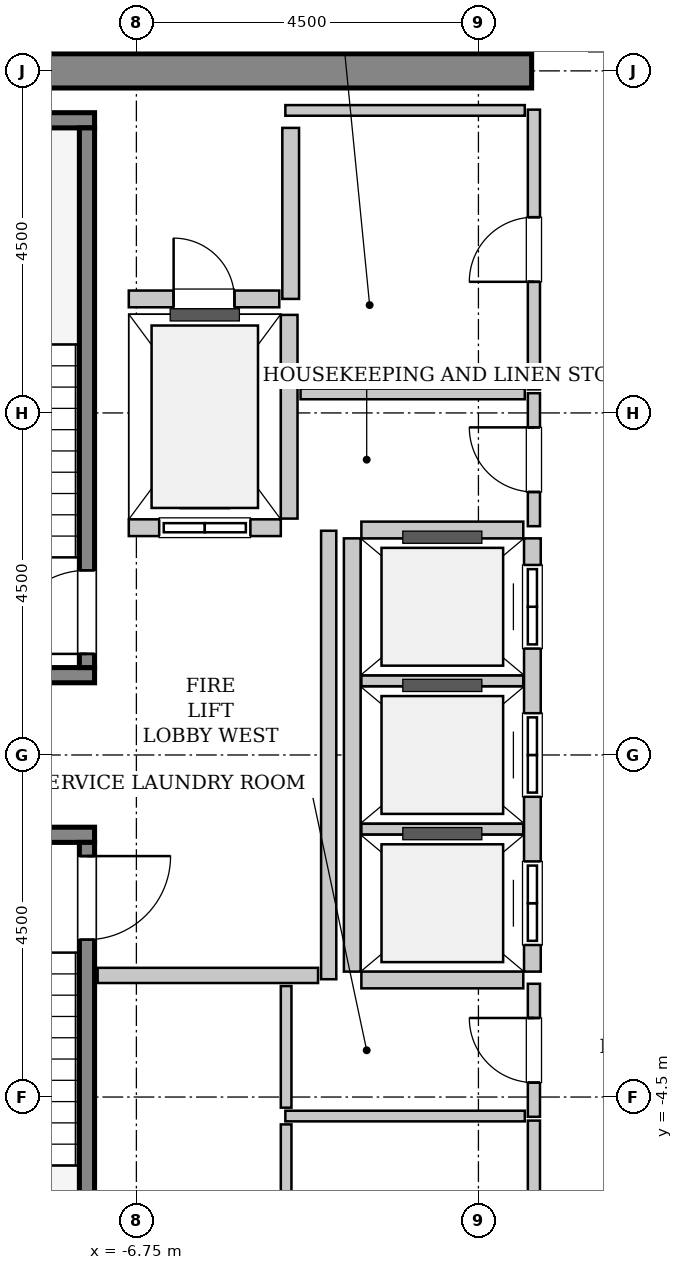
"""IFC4 building model, lengths in metres.
Left out: names, types, materials, properties, quantities, classifications, styles, units other than length and angle.
Written with IfcOpenShell. Run it as: python <this file> out.ifc"""

import sys

from ifc_helpers import new_model, si_unit, direction, frame, frame_2d, origin, place, context, subcontext, project, spatial, rectangle, extrude, source, transform, mapped, element, fill, save


model = new_model("IFC4")
c1 = context("Model", 3, precision=1e-05, world=origin(), true_north=direction((0.0, 1.0)))
c2 = subcontext(c1, "Body", "Model", "MODEL_VIEW")
j1 = project(units=[si_unit("LENGTHUNIT", "METRE"), si_unit("PLANEANGLEUNIT", "RADIAN")], contexts=[c1])
p1 = place(None, origin())
s1 = spatial("IfcSite", under=j1, at=p1, CompositionType="ELEMENT")
p2 = place(p1, origin())
s2 = spatial("IfcBuilding", under=s1, at=p2, CompositionType="ELEMENT")
p3 = place(p2, frame((0.0, 0.0, 298.8)))
s3 = spatial("IfcBuildingStorey", under=s2, at=p3, CompositionType="ELEMENT", Elevation=298.8)
m1 = source(origin(), c2, "Body", "SweptSolid", [
    extrude(rectangle(XDim=9.925, YDim=0.45, at=frame_2d((4.962, 0.0))), origin(), (0.0, 0.0, 1.0), 3.8),
])
p4 = place(p3, frame((-11.475, 9.0, 0.0), z_axis=(0.0, 0.0, 1.0), x_axis=(1.0, 0.0, 0.0)))
e1 = element("IfcWall", 1, at=p4, inside=s3, PredefinedType="SHEAR", context=c2, shape_type="MappedRepresentation", body=[
    mapped(m1, transform((0.0, 0.0, 0.0), x_axis=(1.0, 0.0, 0.0), y_axis=(0.0, 1.0, 0.0), z_axis=(0.0, 0.0, 1.0), scale=1.0)),
])
m2 = source(origin(), c2, "Body", "SweptSolid", [
    extrude(rectangle(XDim=3.4, YDim=0.2, at=frame_2d((1.7, 0.0))), origin(), (0.0, 0.0, 1.0), 3.8),
])
p5 = place(p3, frame((-7.3, 1.05, 0.0), z_axis=(0.0, 0.0, 1.0), x_axis=(-1.0, 0.0, 0.0)))
e2 = element("IfcWall", 2, at=p5, inside=s3, PredefinedType="SOLIDWALL", context=c2, shape_type="MappedRepresentation", body=[
    mapped(m2, transform((0.0, 0.0, 0.0), x_axis=(1.0, 0.0, 0.0), y_axis=(0.0, 1.0, 0.0), z_axis=(0.0, 0.0, 1.0), scale=1.0)),
])
m3 = source(origin(), c2, "Body", "SweptSolid", [
    extrude(rectangle(XDim=3.73, YDim=0.2, at=frame_2d((1.865, 0.0))), origin(), (0.0, 0.0, 1.0), 3.8),
])
p6 = place(p3, frame((-7.3, 8.35, 0.0), z_axis=(0.0, 0.0, 1.0), x_axis=(-1.0, 0.0, 0.0)))
e3 = element("IfcWall", 3, at=p6, inside=s3, PredefinedType="SOLIDWALL", context=c2, shape_type="MappedRepresentation", body=[
    mapped(m3, transform((0.0, 0.0, 0.0), x_axis=(1.0, 0.0, 0.0), y_axis=(0.0, 1.0, 0.0), z_axis=(0.0, 0.0, 1.0), scale=1.0)),
])
m4 = source(origin(), c2, "Body", "SweptSolid", [
    extrude(rectangle(XDim=7.1, YDim=0.2, at=frame_2d((3.55, 0.0))), origin(), (0.0, 0.0, 1.0), 3.8),
])
p7 = place(p3, frame((-7.4, 1.15, 0.0), z_axis=(0.0, 0.0, 1.0), x_axis=(0.0, 1.0, 0.0)))
e4 = element("IfcWall", 4, at=p7, inside=s3, PredefinedType="SOLIDWALL", context=c2, shape_type="MappedRepresentation", body=[
    mapped(m4, transform((0.0, 0.0, 0.0), x_axis=(1.0, 0.0, 0.0), y_axis=(0.0, 1.0, 0.0), z_axis=(0.0, 0.0, 1.0), scale=1.0)),
])
p8 = place(p7, frame((0.18, 0.0, 0.0)))
e5 = element("IfcOpeningElement", 5, at=p8, cuts=e4, PredefinedType="OPENING", context=c2, shape_type="SweptSolid", body=[
    extrude(rectangle(XDim=1.1, YDim=2.15, at=frame_2d((0.55, 1.075))), frame((0.0, 0.11, 0.0), z_axis=(0.0, -1.0, 0.0), x_axis=(1.0, 0.0, 0.0)), (0.0, 0.0, 1.0), 0.22),
])
p9 = place(p3, frame((-10.7, -1.05, 0.0), z_axis=(0.0, 0.0, 1.0), x_axis=(1.0, 0.0, 0.0)))
e6 = element("IfcWall", 6, at=p9, inside=s3, PredefinedType="SOLIDWALL", context=c2, shape_type="MappedRepresentation", body=[
    mapped(m2, transform((0.0, 0.0, 0.0), x_axis=(1.0, 0.0, 0.0), y_axis=(0.0, 1.0, 0.0), z_axis=(0.0, 0.0, 1.0), scale=1.0)),
])
p10 = place(p3, frame((-7.4, -1.15, 0.0), z_axis=(0.0, 0.0, 1.0), x_axis=(0.0, -1.0, 0.0)))
e7 = element("IfcWall", 7, at=p10, inside=s3, PredefinedType="SOLIDWALL", context=c2, shape_type="MappedRepresentation", body=[
    mapped(m4, transform((0.0, 0.0, 0.0), x_axis=(1.0, 0.0, 0.0), y_axis=(0.0, 1.0, 0.0), z_axis=(0.0, 0.0, 1.0), scale=1.0)),
])
p11 = place(p10, frame((0.18, 0.0, 0.0)))
e8 = element("IfcOpeningElement", 8, at=p11, cuts=e7, PredefinedType="OPENING", context=c2, shape_type="SweptSolid", body=[
    extrude(rectangle(XDim=1.1, YDim=2.15, at=frame_2d((0.55, 1.075))), frame((0.0, 0.11, 0.0), z_axis=(0.0, -1.0, 0.0), x_axis=(1.0, 0.0, 0.0)), (0.0, 0.0, 1.0), 0.22),
])
m5 = source(origin(), c2, "Body", "SweptSolid", [
    extrude(rectangle(XDim=2.0, YDim=0.22, at=frame_2d((1.0, 0.0))), origin(), (0.0, 0.0, 1.0), 3.535),
])
p12 = place(p3, frame((-6.85, 2.99, 0.0), z_axis=(0.0, 0.0, 1.0), x_axis=(1.0, 0.0, 0.0)))
e9 = element("IfcWall", 9, at=p12, inside=s3, PredefinedType="SOLIDWALL", context=c2, shape_type="MappedRepresentation", body=[
    mapped(m5, transform((0.0, 0.0, 0.0), x_axis=(1.0, 0.0, 0.0), y_axis=(0.0, 1.0, 0.0), z_axis=(0.0, 0.0, 1.0), scale=1.0)),
])
p13 = place(p12, frame((0.4, 0.0, 0.0)))
e10 = element("IfcOpeningElement", 10, at=p13, cuts=e9, PredefinedType="OPENING", context=c2, shape_type="SweptSolid", body=[
    extrude(rectangle(XDim=1.2, YDim=2.2, at=frame_2d((0.6, 1.1))), frame((0.0, 0.12, 0.0), z_axis=(0.0, -1.0, 0.0), x_axis=(1.0, 0.0, 0.0)), (0.0, 0.0, 1.0), 0.24),
])
m6 = source(origin(), c2, "Body", "SweptSolid", [
    extrude(rectangle(XDim=2.68, YDim=0.22, at=frame_2d((1.34, 0.0))), origin(), (0.0, 0.0, 1.0), 3.535),
])
p14 = place(p3, frame((-4.74, 3.11, 0.0), z_axis=(0.0, 0.0, 1.0), x_axis=(0.0, 1.0, 0.0)))
e11 = element("IfcWall", 11, at=p14, inside=s3, PredefinedType="SOLIDWALL", context=c2, shape_type="MappedRepresentation", body=[
    mapped(m6, transform((0.0, 0.0, 0.0), x_axis=(1.0, 0.0, 0.0), y_axis=(0.0, 1.0, 0.0), z_axis=(0.0, 0.0, 1.0), scale=1.0)),
])
m7 = source(origin(), c2, "Body", "SweptSolid", [
    extrude(rectangle(XDim=5.7, YDim=0.22, at=frame_2d((2.85, 0.0))), origin(), (0.0, 0.0, 1.0), 3.535),
])
p15 = place(p3, frame((-1.54, -2.85, 0.0), z_axis=(0.0, 0.0, 1.0), x_axis=(0.0, 1.0, 0.0)))
e12 = element("IfcWall", 12, at=p15, inside=s3, PredefinedType="SOLIDWALL", context=c2, shape_type="MappedRepresentation", body=[
    mapped(m7, transform((0.0, 0.0, 0.0), x_axis=(1.0, 0.0, 0.0), y_axis=(0.0, 1.0, 0.0), z_axis=(0.0, 0.0, 1.0), scale=1.0)),
])
p16 = place(p15, frame((0.35, 0.0, 0.0)))
e13 = element("IfcOpeningElement", 13, at=p16, cuts=e12, PredefinedType="OPENING", context=c2, shape_type="SweptSolid", body=[
    extrude(rectangle(XDim=1.1, YDim=2.2, at=frame_2d((0.55, 1.1))), frame((0.0, 0.12, 0.0), z_axis=(0.0, -1.0, 0.0), x_axis=(1.0, 0.0, 0.0)), (0.0, 0.0, 1.0), 0.24),
])
p17 = place(p15, frame((2.3, 0.0, 0.0)))
e14 = element("IfcOpeningElement", 14, at=p17, cuts=e12, PredefinedType="OPENING", context=c2, shape_type="SweptSolid", body=[
    extrude(rectangle(XDim=1.1, YDim=2.2, at=frame_2d((0.55, 1.1))), frame((0.0, 0.12, 0.0), z_axis=(0.0, -1.0, 0.0), x_axis=(1.0, 0.0, 0.0)), (0.0, 0.0, 1.0), 0.24),
])
p18 = place(p15, frame((4.25, 0.0, 0.0)))
e15 = element("IfcOpeningElement", 15, at=p18, cuts=e12, PredefinedType="OPENING", context=c2, shape_type="SweptSolid", body=[
    extrude(rectangle(XDim=1.1, YDim=2.2, at=frame_2d((0.55, 1.1))), frame((0.0, 0.12, 0.0), z_axis=(0.0, -1.0, 0.0), x_axis=(1.0, 0.0, 0.0)), (0.0, 0.0, 1.0), 0.24),
])
p19 = place(p3, frame((-3.91, 2.85, 0.0), z_axis=(0.0, 0.0, 1.0), x_axis=(0.0, -1.0, 0.0)))
e16 = element("IfcWall", 16, at=p19, inside=s3, PredefinedType="SOLIDWALL", context=c2, shape_type="MappedRepresentation", body=[
    mapped(m7, transform((0.0, 0.0, 0.0), x_axis=(1.0, 0.0, 0.0), y_axis=(0.0, 1.0, 0.0), z_axis=(0.0, 0.0, 1.0), scale=1.0)),
])
m8 = source(origin(), c2, "Body", "SweptSolid", [
    extrude(rectangle(XDim=2.13, YDim=0.22, at=frame_2d((1.065, 0.0))), origin(), (0.0, 0.0, 1.0), 3.535),
])
p20 = place(p3, frame((-3.79, -2.96, 0.0), z_axis=(0.0, 0.0, 1.0), x_axis=(1.0, 0.0, 0.0)))
e17 = element("IfcWall", 17, at=p20, inside=s3, PredefinedType="SOLIDWALL", context=c2, shape_type="MappedRepresentation", body=[
    mapped(m8, transform((0.0, 0.0, 0.0), x_axis=(1.0, 0.0, 0.0), y_axis=(0.0, 1.0, 0.0), z_axis=(0.0, 0.0, 1.0), scale=1.0)),
])
m9 = source(origin(), c2, "Body", "SweptSolid", [
    extrude(rectangle(XDim=2.13, YDim=0.14, at=frame_2d((1.065, 0.0))), origin(), (0.0, 0.0, 1.0), 3.535),
])
for number, where, z_axis, x_axis in (
    (18, (-3.79, -0.975, 0.0), (0.0, 0.0, 1.0), (1.0, 0.0, 0.0)),
    (19, (-3.79, 0.975, 0.0), (0.0, 0.0, 1.0), (1.0, 0.0, 0.0)),
):
    element("IfcWall", number, at=place(p3, frame(where, z_axis=z_axis, x_axis=x_axis)), inside=s3, PredefinedType="PARTITIONING", context=c2, shape_type="MappedRepresentation", body=[
        mapped(m9, transform((0.0, 0.0, 0.0), x_axis=(1.0, 0.0, 0.0), y_axis=(0.0, 1.0, 0.0), z_axis=(0.0, 0.0, 1.0), scale=1.0)),
    ])
p21 = place(p3, frame((-1.66, 2.96, 0.0), z_axis=(0.0, 0.0, 1.0), x_axis=(-1.0, 0.0, 0.0)))
e20 = element("IfcWall", 20, at=p21, inside=s3, PredefinedType="SOLIDWALL", context=c2, shape_type="MappedRepresentation", body=[
    mapped(m8, transform((0.0, 0.0, 0.0), x_axis=(1.0, 0.0, 0.0), y_axis=(0.0, 1.0, 0.0), z_axis=(0.0, 0.0, 1.0), scale=1.0)),
])
m10 = source(origin(), c2, "Body", "SweptSolid", [
    extrude(rectangle(XDim=2.25, YDim=0.22, at=frame_2d((1.125, 0.0))), origin(), (0.0, 0.0, 1.0), 3.535),
])
p22 = place(p3, frame((-4.72, 6.0, 0.0), z_axis=(0.0, 0.0, 1.0), x_axis=(0.0, 1.0, 0.0)))
e21 = element("IfcWall", 21, at=p22, inside=s3, PredefinedType="SOLIDWALL", context=c2, shape_type="MappedRepresentation", body=[
    mapped(m10, transform((0.0, 0.0, 0.0), x_axis=(1.0, 0.0, 0.0), y_axis=(0.0, 1.0, 0.0), z_axis=(0.0, 0.0, 1.0), scale=1.0)),
])
m11 = source(origin(), c2, "Body", "SweptSolid", [
    extrude(rectangle(XDim=1.98, YDim=0.22, at=frame_2d((0.99, 0.0))), origin(), (0.0, 0.0, 1.0), 3.535),
])
p23 = place(p3, frame((-6.85, 6.0, 0.0), z_axis=(0.0, 0.0, 1.0), x_axis=(1.0, 0.0, 0.0)))
e22 = element("IfcWall", 22, at=p23, inside=s3, PredefinedType="SOLIDWALL", context=c2, shape_type="MappedRepresentation", body=[
    mapped(m11, transform((0.0, 0.0, 0.0), x_axis=(1.0, 0.0, 0.0), y_axis=(0.0, 1.0, 0.0), z_axis=(0.0, 0.0, 1.0), scale=1.0)),
])
p24 = place(p23, frame((0.59, 0.0, 0.0)))
e23 = element("IfcOpeningElement", 23, at=p24, cuts=e22, PredefinedType="OPENING", context=c2, shape_type="SweptSolid", body=[
    extrude(rectangle(XDim=0.8, YDim=2.0, at=frame_2d((0.4, 1.0))), frame((0.0, 0.12, 0.0), z_axis=(0.0, -1.0, 0.0), x_axis=(1.0, 0.0, 0.0)), (0.0, 0.0, 1.0), 0.24),
])
m12 = source(origin(), c2, "Body", "SweptSolid", [
    extrude(rectangle(XDim=5.9, YDim=0.2, at=frame_2d((2.95, 0.0))), origin(), (0.0, 0.0, 1.0), 3.535),
])
p25 = place(p3, frame((-4.22, -2.95, 0.0), z_axis=(0.0, 0.0, 1.0), x_axis=(0.0, 1.0, 0.0)))
e24 = element("IfcWall", 24, at=p25, inside=s3, PredefinedType="PARTITIONING", context=c2, shape_type="MappedRepresentation", body=[
    mapped(m12, transform((0.0, 0.0, 0.0), x_axis=(1.0, 0.0, 0.0), y_axis=(0.0, 1.0, 0.0), z_axis=(0.0, 0.0, 1.0), scale=1.0)),
])
m13 = source(origin(), c2, "Body", "SweptSolid", [
    extrude(rectangle(XDim=2.9, YDim=0.2, at=frame_2d((1.45, 0.0))), origin(), (0.0, 0.0, 1.0), 3.535),
])
p26 = place(p3, frame((-7.26, -2.9, 0.0), z_axis=(0.0, 0.0, 1.0), x_axis=(1.0, 0.0, 0.0)))
e25 = element("IfcWall", 25, at=p26, inside=s3, PredefinedType="PARTITIONING", context=c2, shape_type="MappedRepresentation", body=[
    mapped(m13, transform((0.0, 0.0, 0.0), x_axis=(1.0, 0.0, 0.0), y_axis=(0.0, 1.0, 0.0), z_axis=(0.0, 0.0, 1.0), scale=1.0)),
])
m14 = source(origin(), c2, "Body", "SweptSolid", [
    extrude(rectangle(XDim=1.75, YDim=0.16, at=frame_2d((0.875, 0.0))), origin(), (0.0, 0.0, 1.0), 3.535),
])
p27 = place(p3, frame((-1.52, 3.01, 0.0), z_axis=(0.0, 0.0, 1.0), x_axis=(0.0, 1.0, 0.0)))
e26 = element("IfcWall", 26, at=p27, inside=s3, PredefinedType="PARTITIONING", context=c2, shape_type="MappedRepresentation", body=[
    mapped(m14, transform((0.0, 0.0, 0.0), x_axis=(1.0, 0.0, 0.0), y_axis=(0.0, 1.0, 0.0), z_axis=(0.0, 0.0, 1.0), scale=1.0)),
])
p28 = place(p27, frame((0.45, 0.0, 0.0)))
e27 = element("IfcOpeningElement", 27, at=p28, cuts=e26, PredefinedType="OPENING", context=c2, shape_type="SweptSolid", body=[
    extrude(rectangle(XDim=0.85, YDim=2.1, at=frame_2d((0.425, 1.05))), frame((0.0, 0.09, 0.0), z_axis=(0.0, -1.0, 0.0), x_axis=(1.0, 0.0, 0.0)), (0.0, 0.0, 1.0), 0.18),
])
m15 = source(origin(), c2, "Body", "SweptSolid", [
    extrude(rectangle(XDim=2.95, YDim=0.14, at=frame_2d((1.475, 0.0))), origin(), (0.0, 0.0, 1.0), 3.535),
])
p29 = place(p3, frame((-4.59, 4.75, 0.0), z_axis=(0.0, 0.0, 1.0), x_axis=(1.0, 0.0, 0.0)))
e28 = element("IfcWall", 28, at=p29, inside=s3, PredefinedType="PARTITIONING", context=c2, shape_type="MappedRepresentation", body=[
    mapped(m15, transform((0.0, 0.0, 0.0), x_axis=(1.0, 0.0, 0.0), y_axis=(0.0, 1.0, 0.0), z_axis=(0.0, 0.0, 1.0), scale=1.0)),
])
m16 = source(origin(), c2, "Body", "SweptSolid", [
    extrude(rectangle(XDim=3.68, YDim=0.16, at=frame_2d((1.84, 0.0))), origin(), (0.0, 0.0, 1.0), 3.535),
])
p30 = place(p3, frame((-1.52, 4.81, 0.0), z_axis=(0.0, 0.0, 1.0), x_axis=(0.0, 1.0, 0.0)))
e29 = element("IfcWall", 29, at=p30, inside=s3, PredefinedType="PARTITIONING", context=c2, shape_type="MappedRepresentation", body=[
    mapped(m16, transform((0.0, 0.0, 0.0), x_axis=(1.0, 0.0, 0.0), y_axis=(0.0, 1.0, 0.0), z_axis=(0.0, 0.0, 1.0), scale=1.0)),
])
p31 = place(p30, frame((1.415, 0.0, 0.0)))
e30 = element("IfcOpeningElement", 30, at=p31, cuts=e29, PredefinedType="OPENING", context=c2, shape_type="SweptSolid", body=[
    extrude(rectangle(XDim=0.85, YDim=2.1, at=frame_2d((0.425, 1.05))), frame((0.0, 0.09, 0.0), z_axis=(0.0, -1.0, 0.0), x_axis=(1.0, 0.0, 0.0)), (0.0, 0.0, 1.0), 0.18),
])
m17 = source(origin(), c2, "Body", "SweptSolid", [
    extrude(rectangle(XDim=3.15, YDim=0.14, at=frame_2d((1.575, 0.0))), origin(), (0.0, 0.0, 1.0), 3.535),
])
p32 = place(p3, frame((-4.79, 8.48, 0.0), z_axis=(0.0, 0.0, 1.0), x_axis=(1.0, 0.0, 0.0)))
e31 = element("IfcWall", 31, at=p32, inside=s3, PredefinedType="PARTITIONING", context=c2, shape_type="MappedRepresentation", body=[
    mapped(m17, transform((0.0, 0.0, 0.0), x_axis=(1.0, 0.0, 0.0), y_axis=(0.0, 1.0, 0.0), z_axis=(0.0, 0.0, 1.0), scale=1.0)),
])
p33 = place(p3, frame((-1.52, -4.76, 0.0), z_axis=(0.0, 0.0, 1.0), x_axis=(0.0, 1.0, 0.0)))
e32 = element("IfcWall", 32, at=p33, inside=s3, PredefinedType="PARTITIONING", context=c2, shape_type="MappedRepresentation", body=[
    mapped(m14, transform((0.0, 0.0, 0.0), x_axis=(1.0, 0.0, 0.0), y_axis=(0.0, 1.0, 0.0), z_axis=(0.0, 0.0, 1.0), scale=1.0)),
])
p34 = place(p33, frame((0.45, 0.0, 0.0)))
e33 = element("IfcOpeningElement", 33, at=p34, cuts=e32, PredefinedType="OPENING", context=c2, shape_type="SweptSolid", body=[
    extrude(rectangle(XDim=0.85, YDim=2.1, at=frame_2d((0.425, 1.05))), frame((0.0, 0.09, 0.0), z_axis=(0.0, -1.0, 0.0), x_axis=(1.0, 0.0, 0.0)), (0.0, 0.0, 1.0), 0.18),
])
p35 = place(p3, frame((-4.79, -4.75, 0.0), z_axis=(0.0, 0.0, 1.0), x_axis=(1.0, 0.0, 0.0)))
e34 = element("IfcWall", 34, at=p35, inside=s3, PredefinedType="PARTITIONING", context=c2, shape_type="MappedRepresentation", body=[
    mapped(m17, transform((0.0, 0.0, 0.0), x_axis=(1.0, 0.0, 0.0), y_axis=(0.0, 1.0, 0.0), z_axis=(0.0, 0.0, 1.0), scale=1.0)),
])
m18 = source(origin(), c2, "Body", "SweptSolid", [
    extrude(rectangle(XDim=1.6, YDim=0.14, at=frame_2d((0.8, 0.0))), origin(), (0.0, 0.0, 1.0), 3.535),
])
p36 = place(p3, frame((-4.78, -4.64, 0.0), z_axis=(0.0, 0.0, 1.0), x_axis=(0.0, 1.0, 0.0)))
e35 = element("IfcWall", 35, at=p36, inside=s3, PredefinedType="PARTITIONING", context=c2, shape_type="MappedRepresentation", body=[
    mapped(m18, transform((0.0, 0.0, 0.0), x_axis=(1.0, 0.0, 0.0), y_axis=(0.0, 1.0, 0.0), z_axis=(0.0, 0.0, 1.0), scale=1.0)),
])
p37 = place(p3, frame((-1.52, -8.49, 0.0), z_axis=(0.0, 0.0, 1.0), x_axis=(0.0, 1.0, 0.0)))
e36 = element("IfcWall", 36, at=p37, inside=s3, PredefinedType="PARTITIONING", context=c2, shape_type="MappedRepresentation", body=[
    mapped(m16, transform((0.0, 0.0, 0.0), x_axis=(1.0, 0.0, 0.0), y_axis=(0.0, 1.0, 0.0), z_axis=(0.0, 0.0, 1.0), scale=1.0)),
])
p38 = place(p37, frame((1.415, 0.0, 0.0)))
e37 = element("IfcOpeningElement", 37, at=p38, cuts=e36, PredefinedType="OPENING", context=c2, shape_type="SweptSolid", body=[
    extrude(rectangle(XDim=0.85, YDim=2.1, at=frame_2d((0.425, 1.05))), frame((0.0, 0.09, 0.0), z_axis=(0.0, -1.0, 0.0), x_axis=(1.0, 0.0, 0.0)), (0.0, 0.0, 1.0), 0.18),
])
m19 = source(origin(), c2, "Body", "SweptSolid", [
    extrude(rectangle(XDim=3.63, YDim=0.14, at=frame_2d((1.815, 0.0))), origin(), (0.0, 0.0, 1.0), 3.535),
])
p39 = place(p3, frame((-4.78, -8.49, 0.0), z_axis=(0.0, 0.0, 1.0), x_axis=(0.0, 1.0, 0.0)))
e38 = element("IfcWall", 38, at=p39, inside=s3, PredefinedType="PARTITIONING", context=c2, shape_type="MappedRepresentation", body=[
    mapped(m19, transform((0.0, 0.0, 0.0), x_axis=(1.0, 0.0, 0.0), y_axis=(0.0, 1.0, 0.0), z_axis=(0.0, 0.0, 1.0), scale=1.0)),
])
m20 = source(origin(), c2, "Body", "SweptSolid", [
    extrude(rectangle(XDim=1.1, YDim=2.15, at=frame_2d((0.55, 1.075))), frame((0.0, 0.025, 0.0), z_axis=(0.0, -1.0, 0.0), x_axis=(1.0, 0.0, 0.0)), (0.0, 0.0, 1.0), 0.05),
])
p40 = place(p8, origin())
e39 = element("IfcDoor", 39, at=p40, inside=s3, OperationType="SINGLE_SWING_LEFT", PredefinedType="DOOR", context=c2, shape_type="MappedRepresentation", body=[
    mapped(m20, transform((0.0, 0.0, 0.0), x_axis=(1.0, 0.0, 0.0), y_axis=(0.0, 1.0, 0.0), z_axis=(0.0, 0.0, 1.0), scale=1.0)),
])
fill(e5, e39)
p41 = place(p11, origin())
e40 = element("IfcDoor", 40, at=p41, inside=s3, OperationType="SINGLE_SWING_LEFT", PredefinedType="DOOR", context=c2, shape_type="MappedRepresentation", body=[
    mapped(m20, transform((0.0, 0.0, 0.0), x_axis=(1.0, 0.0, 0.0), y_axis=(0.0, 1.0, 0.0), z_axis=(0.0, 0.0, 1.0), scale=1.0)),
])
fill(e8, e40)
m21 = source(origin(), c2, "Body", "SweptSolid", [
    extrude(rectangle(XDim=1.2, YDim=2.2, at=frame_2d((0.6, 1.1))), frame((0.0, 0.025, 0.0), z_axis=(0.0, -1.0, 0.0), x_axis=(1.0, 0.0, 0.0)), (0.0, 0.0, 1.0), 0.05),
])
p42 = place(p13, origin())
e41 = element("IfcDoor", 41, at=p42, inside=s3, OperationType="SLIDING_TO_LEFT", PredefinedType="DOOR", context=c2, shape_type="MappedRepresentation", body=[
    mapped(m21, transform((0.0, 0.0, 0.0), x_axis=(1.0, 0.0, 0.0), y_axis=(0.0, 1.0, 0.0), z_axis=(0.0, 0.0, 1.0), scale=1.0)),
])
fill(e10, e41)
m22 = source(origin(), c2, "Body", "SweptSolid", [
    extrude(rectangle(XDim=1.1, YDim=2.2, at=frame_2d((0.55, 1.1))), frame((0.0, 0.025, 0.0), z_axis=(0.0, -1.0, 0.0), x_axis=(1.0, 0.0, 0.0)), (0.0, 0.0, 1.0), 0.05),
])
p43 = place(p16, origin())
e42 = element("IfcDoor", 42, at=p43, inside=s3, OperationType="DOUBLE_DOOR_SLIDING", PredefinedType="DOOR", context=c2, shape_type="MappedRepresentation", body=[
    mapped(m22, transform((0.0, 0.0, 0.0), x_axis=(1.0, 0.0, 0.0), y_axis=(0.0, 1.0, 0.0), z_axis=(0.0, 0.0, 1.0), scale=1.0)),
])
fill(e13, e42)
p44 = place(p17, origin())
e43 = element("IfcDoor", 43, at=p44, inside=s3, OperationType="DOUBLE_DOOR_SLIDING", PredefinedType="DOOR", context=c2, shape_type="MappedRepresentation", body=[
    mapped(m22, transform((0.0, 0.0, 0.0), x_axis=(1.0, 0.0, 0.0), y_axis=(0.0, 1.0, 0.0), z_axis=(0.0, 0.0, 1.0), scale=1.0)),
])
fill(e14, e43)
p45 = place(p18, origin())
e44 = element("IfcDoor", 44, at=p45, inside=s3, OperationType="DOUBLE_DOOR_SLIDING", PredefinedType="DOOR", context=c2, shape_type="MappedRepresentation", body=[
    mapped(m22, transform((0.0, 0.0, 0.0), x_axis=(1.0, 0.0, 0.0), y_axis=(0.0, 1.0, 0.0), z_axis=(0.0, 0.0, 1.0), scale=1.0)),
])
fill(e15, e44)
m23 = source(origin(), c2, "Body", "SweptSolid", [
    extrude(rectangle(XDim=0.8, YDim=2.0, at=frame_2d((0.4, 1.0))), frame((0.0, 0.025, 0.0), z_axis=(0.0, -1.0, 0.0), x_axis=(1.0, 0.0, 0.0)), (0.0, 0.0, 1.0), 0.05),
])
p46 = place(p24, origin())
e45 = element("IfcDoor", 45, at=p46, inside=s3, OperationType="SINGLE_SWING_LEFT", PredefinedType="TRAPDOOR", context=c2, shape_type="MappedRepresentation", body=[
    mapped(m23, transform((0.0, 0.0, 0.0), x_axis=(1.0, 0.0, 0.0), y_axis=(0.0, 1.0, 0.0), z_axis=(0.0, 0.0, 1.0), scale=1.0)),
])
fill(e23, e45)
m24 = source(origin(), c2, "Body", "SweptSolid", [
    extrude(rectangle(XDim=0.85, YDim=2.1, at=frame_2d((0.425, 1.05))), frame((0.0, 0.025, 0.0), z_axis=(0.0, -1.0, 0.0), x_axis=(1.0, 0.0, 0.0)), (0.0, 0.0, 1.0), 0.05),
])
p47 = place(p28, origin())
e46 = element("IfcDoor", 46, at=p47, inside=s3, OperationType="SINGLE_SWING_RIGHT", PredefinedType="DOOR", context=c2, shape_type="MappedRepresentation", body=[
    mapped(m24, transform((0.0, 0.0, 0.0), x_axis=(1.0, 0.0, 0.0), y_axis=(0.0, 1.0, 0.0), z_axis=(0.0, 0.0, 1.0), scale=1.0)),
])
fill(e27, e46)
p48 = place(p31, origin())
e47 = element("IfcDoor", 47, at=p48, inside=s3, OperationType="SINGLE_SWING_LEFT", PredefinedType="DOOR", context=c2, shape_type="MappedRepresentation", body=[
    mapped(m24, transform((0.0, 0.0, 0.0), x_axis=(1.0, 0.0, 0.0), y_axis=(0.0, 1.0, 0.0), z_axis=(0.0, 0.0, 1.0), scale=1.0)),
])
fill(e30, e47)
p49 = place(p34, origin())
e48 = element("IfcDoor", 48, at=p49, inside=s3, OperationType="SINGLE_SWING_RIGHT", PredefinedType="DOOR", context=c2, shape_type="MappedRepresentation", body=[
    mapped(m24, transform((0.0, 0.0, 0.0), x_axis=(1.0, 0.0, 0.0), y_axis=(0.0, 1.0, 0.0), z_axis=(0.0, 0.0, 1.0), scale=1.0)),
])
fill(e33, e48)
save(model, sys.argv[1])
